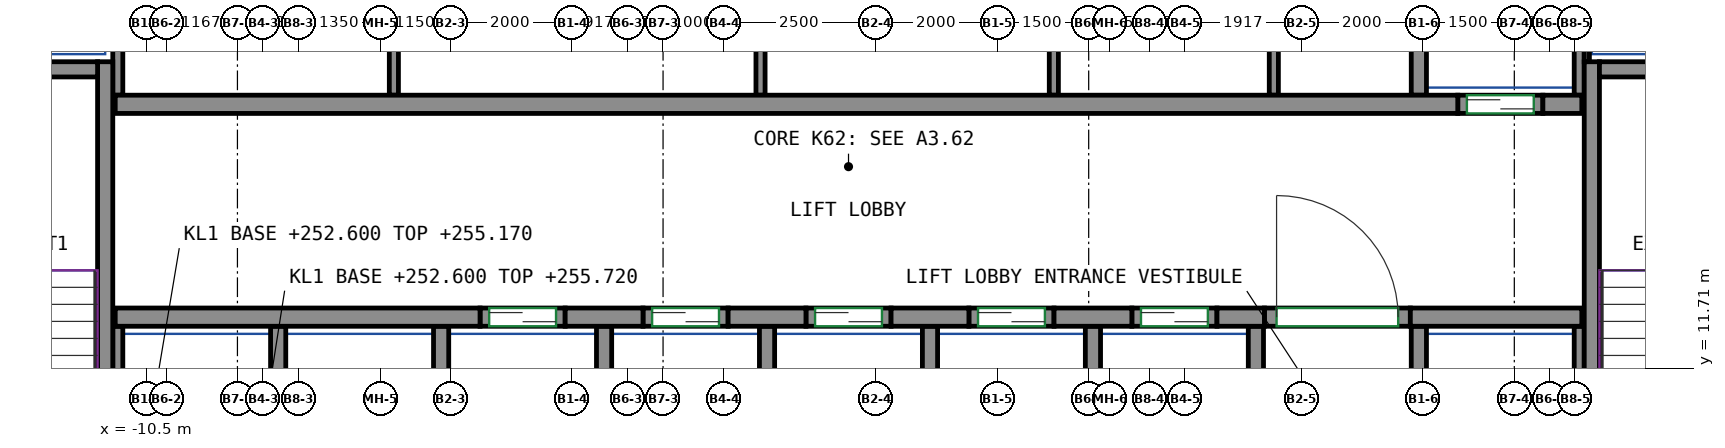
"""IFC4 building model, lengths in metres.
Left out: names, types, materials, properties, quantities, classifications, styles, units other than length and angle.
Written with IfcOpenShell. Run it as: python <this file> out.ifc"""

import sys

from ifc_helpers import new_model, si_unit, direction, frame, frame_2d, origin, place, context, subcontext, project, spatial, rectangle, extrude, source, transform, mapped, element, fill, save


model = new_model("IFC4")
c1 = context("Model", 3, precision=1e-05, world=origin(), true_north=direction((0.0, 1.0)))
c2 = subcontext(c1, "Body", "Model", "MODEL_VIEW")
j1 = project(units=[si_unit("LENGTHUNIT", "METRE"), si_unit("PLANEANGLEUNIT", "RADIAN")], contexts=[c1])
p1 = place(None, origin())
s1 = spatial("IfcSite", under=j1, at=p1, CompositionType="ELEMENT")
p2 = place(p1, origin())
s2 = spatial("IfcBuilding", under=s1, at=p2, CompositionType="ELEMENT")
p3 = place(p2, frame((0.0, 0.0, 252.6)))
s3 = spatial("IfcBuildingStorey", under=s2, at=p3, CompositionType="ELEMENT", Elevation=252.6)
m1 = source(origin(), c2, "Body", "SweptSolid", [
    extrude(rectangle(XDim=7.75, YDim=0.25, at=frame_2d((3.875, 0.0))), origin(), (0.0, 0.0, 1.0), 3.12),
])
p4 = place(p3, frame((-11.175, 9.0, 0.0), z_axis=(0.0, 0.0, 1.0), x_axis=(0.0, 1.0, 0.0)))
e1 = element("IfcWall", 1, at=p4, inside=s3, PredefinedType="SHEAR", context=c2, shape_type="MappedRepresentation", body=[
    mapped(m1, transform((0.0, 0.0, 0.0))),
])
m2 = source(origin(), c2, "Body", "SweptSolid", [
    extrude(rectangle(XDim=3.7, YDim=0.25, at=frame_2d((1.85, 0.0))), origin(), (0.0, 0.0, 1.0), 3.12),
])
p5 = place(p3, frame((-15.0, 16.625, 0.0), z_axis=(0.0, 0.0, 1.0), x_axis=(1.0, 0.0, 0.0)))
e2 = element("IfcWall", 2, at=p5, inside=s3, PredefinedType="SHEAR", context=c2, shape_type="MappedRepresentation", body=[
    mapped(m2, transform((0.0, 0.0, 0.0))),
])
p6 = place(p3, frame((13.275, 9.0, 0.0), z_axis=(0.0, 0.0, 1.0), x_axis=(0.0, 1.0, 0.0)))
e3 = element("IfcWall", 3, at=p6, inside=s3, PredefinedType="SHEAR", context=c2, shape_type="MappedRepresentation", body=[
    mapped(m1, transform((0.0, 0.0, 0.0))),
])
m3 = source(origin(), c2, "Body", "SweptSolid", [
    extrude(rectangle(XDim=3.7, YDim=0.25, at=frame_2d((1.85, 0.0))), origin(), (0.0, 0.0, 1.0), 3.12),
])
p7 = place(p3, frame((13.4, 16.625, 0.0), z_axis=(0.0, 0.0, 1.0), x_axis=(1.0, 0.0, 0.0)))
e4 = element("IfcWall", 4, at=p7, inside=s3, PredefinedType="SHEAR", context=c2, shape_type="MappedRepresentation", body=[
    mapped(m3, transform((0.0, 0.0, 0.0))),
])
m4 = source(origin(), c2, "Body", "SweptSolid", [
    extrude(rectangle(XDim=6.0, YDim=0.3, at=frame_2d((3.0, 0.0))), origin(), (0.0, 0.0, 1.0), 3.12),
])
p8 = place(p3, frame((-11.01, 12.55, 0.0), z_axis=(0.0, 0.0, 1.0), x_axis=(1.0, 0.0, 0.0)))
e5 = element("IfcWall", 5, at=p8, inside=s3, PredefinedType="SHEAR", context=c2, shape_type="MappedRepresentation", body=[
    mapped(m4, transform((0.0, 0.0, 0.0))),
])
m5 = source(origin(), c2, "Body", "SweptSolid", [
    extrude(rectangle(XDim=1.28, YDim=0.3, at=frame_2d((0.64, 0.0))), origin(), (0.0, 0.0, 1.0), 3.12),
])
for number, where, z_axis, x_axis in (
    (6, (-3.61, 12.55, 0.0), (0.0, 0.0, 1.0), (1.0, 0.0, 0.0)),
    (7, (-0.93, 12.55, 0.0), (0.0, 0.0, 1.0), (1.0, 0.0, 0.0)),
    (8, (1.75, 12.55, 0.0), (0.0, 0.0, 1.0), (1.0, 0.0, 0.0)),
    (9, (4.43, 12.55, 0.0), (0.0, 0.0, 1.0), (1.0, 0.0, 0.0)),
):
    element("IfcWall", number, at=place(p3, frame(where, z_axis=z_axis, x_axis=x_axis)), inside=s3, PredefinedType="SHEAR", context=c2, shape_type="MappedRepresentation", body=[
        mapped(m5, transform((0.0, 0.0, 0.0))),
    ])
m6 = source(origin(), c2, "Body", "SweptSolid", [
    extrude(rectangle(XDim=0.78, YDim=0.3, at=frame_2d((0.39, 0.0))), origin(), (0.0, 0.0, 1.0), 3.12),
])
p9 = place(p3, frame((7.11, 12.55, 0.0), z_axis=(0.0, 0.0, 1.0), x_axis=(1.0, 0.0, 0.0)))
e10 = element("IfcWall", 10, at=p9, inside=s3, PredefinedType="SHEAR", context=c2, shape_type="MappedRepresentation", body=[
    mapped(m6, transform((0.0, 0.0, 0.0))),
])
m7 = source(origin(), c2, "Body", "SweptSolid", [
    extrude(rectangle(XDim=2.82, YDim=0.3, at=frame_2d((1.41, 0.0))), origin(), (0.0, 0.0, 1.0), 3.12),
])
p10 = place(p3, frame((10.29, 12.55, 0.0), z_axis=(0.0, 0.0, 1.0), x_axis=(1.0, 0.0, 0.0)))
e11 = element("IfcWall", 11, at=p10, inside=s3, PredefinedType="SHEAR", context=c2, shape_type="MappedRepresentation", body=[
    mapped(m7, transform((0.0, 0.0, 0.0))),
])
m8 = source(origin(), c2, "Body", "SweptSolid", [
    extrude(rectangle(XDim=22.08, YDim=0.3, at=frame_2d((11.04, 0.0))), origin(), (0.0, 0.0, 1.0), 3.12),
])
p11 = place(p3, frame((-11.01, 16.05, 0.0), z_axis=(0.0, 0.0, 1.0), x_axis=(1.0, 0.0, 0.0)))
e12 = element("IfcWall", 12, at=p11, inside=s3, PredefinedType="SHEAR", context=c2, shape_type="MappedRepresentation", body=[
    mapped(m8, transform((0.0, 0.0, 0.0))),
])
m9 = source(origin(), c2, "Body", "SweptSolid", [
    extrude(rectangle(XDim=0.64, YDim=0.3, at=frame_2d((0.32, 0.0))), origin(), (0.0, 0.0, 1.0), 3.12),
])
p12 = place(p3, frame((12.47, 16.05, 0.0), z_axis=(0.0, 0.0, 1.0), x_axis=(1.0, 0.0, 0.0)))
e13 = element("IfcWall", 13, at=p12, inside=s3, PredefinedType="SHEAR", context=c2, shape_type="MappedRepresentation", body=[
    mapped(m9, transform((0.0, 0.0, 0.0))),
])
m10 = source(origin(), c2, "Body", "SweptSolid", [
    extrude(rectangle(XDim=1.4, YDim=0.3, at=frame_2d((0.7, 0.0))), origin(), (0.0, 0.0, 1.0), 3.12),
])
p13 = place(p3, frame((-5.01, 12.55, 0.0), z_axis=(0.0, 0.0, 1.0), x_axis=(1.0, 0.0, 0.0)))
e14 = element("IfcWall", 14, at=p13, inside=s3, PredefinedType="PARTITIONING", context=c2, shape_type="MappedRepresentation", body=[
    mapped(m10, transform((0.0, 0.0, 0.0))),
])
p14 = place(p13, frame((0.15, 0.0, 0.0)))
e15 = element("IfcOpeningElement", 15, at=p14, cuts=e14, PredefinedType="OPENING", context=c2, shape_type="SweptSolid", body=[
    extrude(rectangle(XDim=1.1, YDim=2.1, at=frame_2d((0.55, 1.05))), frame((0.0, 0.16, 0.0), z_axis=(0.0, -1.0, 0.0), x_axis=(1.0, 0.0, 0.0)), (0.0, 0.0, 1.0), 0.32),
])
m11 = source(origin(), c2, "Body", "SweptSolid", [
    extrude(rectangle(XDim=1.4, YDim=0.3, at=frame_2d((0.7, 0.0))), origin(), (0.0, 0.0, 1.0), 3.12),
])
p15 = place(p3, frame((-2.33, 12.55, 0.0), z_axis=(0.0, 0.0, 1.0), x_axis=(1.0, 0.0, 0.0)))
e16 = element("IfcWall", 16, at=p15, inside=s3, PredefinedType="PARTITIONING", context=c2, shape_type="MappedRepresentation", body=[
    mapped(m11, transform((0.0, 0.0, 0.0))),
])
p16 = place(p15, frame((0.15, 0.0, 0.0)))
e17 = element("IfcOpeningElement", 17, at=p16, cuts=e16, PredefinedType="OPENING", context=c2, shape_type="SweptSolid", body=[
    extrude(rectangle(XDim=1.1, YDim=2.1, at=frame_2d((0.55, 1.05))), frame((0.0, 0.16, 0.0), z_axis=(0.0, -1.0, 0.0), x_axis=(1.0, 0.0, 0.0)), (0.0, 0.0, 1.0), 0.32),
])
p17 = place(p3, frame((0.35, 12.55, 0.0), z_axis=(0.0, 0.0, 1.0), x_axis=(1.0, 0.0, 0.0)))
e18 = element("IfcWall", 18, at=p17, inside=s3, PredefinedType="PARTITIONING", context=c2, shape_type="MappedRepresentation", body=[
    mapped(m10, transform((0.0, 0.0, 0.0))),
])
p18 = place(p17, frame((0.15, 0.0, 0.0)))
e19 = element("IfcOpeningElement", 19, at=p18, cuts=e18, PredefinedType="OPENING", context=c2, shape_type="SweptSolid", body=[
    extrude(rectangle(XDim=1.1, YDim=2.1, at=frame_2d((0.55, 1.05))), frame((0.0, 0.16, 0.0), z_axis=(0.0, -1.0, 0.0), x_axis=(1.0, 0.0, 0.0)), (0.0, 0.0, 1.0), 0.32),
])
p19 = place(p3, frame((3.03, 12.55, 0.0), z_axis=(0.0, 0.0, 1.0), x_axis=(1.0, 0.0, 0.0)))
e20 = element("IfcWall", 20, at=p19, inside=s3, PredefinedType="PARTITIONING", context=c2, shape_type="MappedRepresentation", body=[
    mapped(m10, transform((0.0, 0.0, 0.0))),
])
p20 = place(p19, frame((0.15, 0.0, 0.0)))
e21 = element("IfcOpeningElement", 21, at=p20, cuts=e20, PredefinedType="OPENING", context=c2, shape_type="SweptSolid", body=[
    extrude(rectangle(XDim=1.1, YDim=2.1, at=frame_2d((0.55, 1.05))), frame((0.0, 0.16, 0.0), z_axis=(0.0, -1.0, 0.0), x_axis=(1.0, 0.0, 0.0)), (0.0, 0.0, 1.0), 0.32),
])
p21 = place(p3, frame((5.71, 12.55, 0.0), z_axis=(0.0, 0.0, 1.0), x_axis=(1.0, 0.0, 0.0)))
e22 = element("IfcWall", 22, at=p21, inside=s3, PredefinedType="PARTITIONING", context=c2, shape_type="MappedRepresentation", body=[
    mapped(m11, transform((0.0, 0.0, 0.0))),
])
p22 = place(p21, frame((0.15, 0.0, 0.0)))
e23 = element("IfcOpeningElement", 23, at=p22, cuts=e22, PredefinedType="OPENING", context=c2, shape_type="SweptSolid", body=[
    extrude(rectangle(XDim=1.1, YDim=2.1, at=frame_2d((0.55, 1.05))), frame((0.0, 0.16, 0.0), z_axis=(0.0, -1.0, 0.0), x_axis=(1.0, 0.0, 0.0)), (0.0, 0.0, 1.0), 0.32),
])
p23 = place(p3, frame((11.07, 16.05, 0.0), z_axis=(0.0, 0.0, 1.0), x_axis=(1.0, 0.0, 0.0)))
e24 = element("IfcWall", 24, at=p23, inside=s3, PredefinedType="PARTITIONING", context=c2, shape_type="MappedRepresentation", body=[
    mapped(m10, transform((0.0, 0.0, 0.0))),
])
p24 = place(p23, frame((0.15, 0.0, 0.0)))
e25 = element("IfcOpeningElement", 25, at=p24, cuts=e24, PredefinedType="OPENING", context=c2, shape_type="SweptSolid", body=[
    extrude(rectangle(XDim=1.1, YDim=2.1, at=frame_2d((0.55, 1.05))), frame((0.0, 0.16, 0.0), z_axis=(0.0, -1.0, 0.0), x_axis=(1.0, 0.0, 0.0)), (0.0, 0.0, 1.0), 0.32),
])
m12 = source(origin(), c2, "Body", "SweptSolid", [
    extrude(rectangle(XDim=2.4, YDim=0.3, at=frame_2d((1.2, 0.0))), origin(), (0.0, 0.0, 1.0), 3.12),
])
p25 = place(p3, frame((7.89, 12.55, 0.0), z_axis=(0.0, 0.0, 1.0), x_axis=(1.0, 0.0, 0.0)))
e26 = element("IfcWall", 26, at=p25, inside=s3, PredefinedType="PARTITIONING", context=c2, shape_type="MappedRepresentation", body=[
    mapped(m12, transform((0.0, 0.0, 0.0))),
])
p26 = place(p25, frame((0.2, 0.0, 0.0)))
e27 = element("IfcOpeningElement", 27, at=p26, cuts=e26, PredefinedType="OPENING", context=c2, shape_type="SweptSolid", body=[
    extrude(rectangle(XDim=2.0, YDim=2.1, at=frame_2d((1.0, 1.05))), frame((0.0, 0.16, 0.0), z_axis=(0.0, -1.0, 0.0), x_axis=(1.0, 0.0, 0.0)), (0.0, 0.0, 1.0), 0.32),
])
m13 = source(origin(), c2, "Body", "SweptSolid", [
    extrude(rectangle(XDim=3.275, YDim=0.165, at=frame_2d((1.638, 0.0))), origin(), (0.0, 0.0, 1.0), 3.12),
])
p27 = place(p3, frame((13.067, 16.2, 0.0), z_axis=(0.0, 0.0, 1.0), x_axis=(0.0, 1.0, 0.0)))
e28 = element("IfcWall", 28, at=p27, inside=s3, PredefinedType="PARTITIONING", context=c2, shape_type="MappedRepresentation", body=[
    mapped(m13, transform((0.0, 0.0, 0.0))),
])
m14 = source(origin(), c2, "Body", "SweptSolid", [
    extrude(rectangle(XDim=4.8, YDim=0.165, at=frame_2d((2.4, 0.0))), origin(), (0.0, 0.0, 1.0), 3.12),
])
p28 = place(p3, frame((-10.968, 16.2, 0.0), z_axis=(0.0, 0.0, 1.0), x_axis=(0.0, 1.0, 0.0)))
e29 = element("IfcWall", 29, at=p28, inside=s3, PredefinedType="PARTITIONING", context=c2, shape_type="MappedRepresentation", body=[
    mapped(m14, transform((0.0, 0.0, 0.0))),
])
m15 = source(origin(), c2, "Body", "SweptSolid", [
    extrude(rectangle(XDim=3.275, YDim=0.25, at=frame_2d((1.638, 0.0))), origin(), (0.0, 0.0, 1.0), 3.12),
])
p29 = place(p3, frame((10.43, 16.2, 0.0), z_axis=(0.0, 0.0, 1.0), x_axis=(0.0, 1.0, 0.0)))
e30 = element("IfcWall", 30, at=p29, inside=s3, PredefinedType="PARTITIONING", context=c2, shape_type="MappedRepresentation", body=[
    mapped(m15, transform((0.0, 0.0, 0.0))),
])
m16 = source(origin(), c2, "Body", "SweptSolid", [
    extrude(rectangle(XDim=2.725, YDim=0.085, at=frame_2d((1.363, 0.0))), origin(), (0.0, 0.0, 1.0), 3.12),
])
p30 = place(p3, frame((13.192, 16.75, 0.0), z_axis=(0.0, 0.0, 1.0), x_axis=(0.0, 1.0, 0.0)))
e31 = element("IfcWall", 31, at=p30, inside=s3, PredefinedType="PARTITIONING", context=c2, shape_type="MappedRepresentation", body=[
    mapped(m16, transform((0.0, 0.0, 0.0))),
])
m17 = source(origin(), c2, "Body", "SweptSolid", [
    extrude(rectangle(XDim=3.4, YDim=0.25, at=frame_2d((1.7, 0.0))), origin(), (0.0, 0.0, 1.0), 3.12),
])
p31 = place(p3, frame((10.43, 9.0, 0.0), z_axis=(0.0, 0.0, 1.0), x_axis=(0.0, 1.0, 0.0)))
e32 = element("IfcWall", 32, at=p31, inside=s3, PredefinedType="PARTITIONING", context=c2, shape_type="MappedRepresentation", body=[
    mapped(m17, transform((0.0, 0.0, 0.0))),
])
m18 = source(origin(), c2, "Body", "SweptSolid", [
    extrude(rectangle(XDim=3.4, YDim=0.165, at=frame_2d((1.7, 0.0))), origin(), (0.0, 0.0, 1.0), 3.12),
])
p32 = place(p3, frame((13.067, 9.0, 0.0), z_axis=(0.0, 0.0, 1.0), x_axis=(0.0, 1.0, 0.0)))
e33 = element("IfcWall", 33, at=p32, inside=s3, PredefinedType="PARTITIONING", context=c2, shape_type="MappedRepresentation", body=[
    mapped(m18, transform((0.0, 0.0, 0.0))),
])
for number, where, z_axis, x_axis in (
    (34, (2.39, 9.0, 0.0), (0.0, 0.0, 1.0), (0.0, 1.0, 0.0)),
    (35, (5.07, 9.0, 0.0), (0.0, 0.0, 1.0), (0.0, 1.0, 0.0)),
    (36, (7.75, 9.0, 0.0), (0.0, 0.0, 1.0), (0.0, 1.0, 0.0)),
    (37, (-0.29, 9.0, 0.0), (0.0, 0.0, 1.0), (0.0, 1.0, 0.0)),
):
    element("IfcWall", number, at=place(p3, frame(where, z_axis=z_axis, x_axis=x_axis)), inside=s3, PredefinedType="PARTITIONING", context=c2, shape_type="MappedRepresentation", body=[
        mapped(m17, transform((0.0, 0.0, 0.0))),
    ])
p33 = place(p3, frame((-10.968, 9.0, 0.0), z_axis=(0.0, 0.0, 1.0), x_axis=(0.0, 1.0, 0.0)))
e38 = element("IfcWall", 38, at=p33, inside=s3, PredefinedType="PARTITIONING", context=c2, shape_type="MappedRepresentation", body=[
    mapped(m18, transform((0.0, 0.0, 0.0))),
])
for number, where, z_axis, x_axis in (
    (39, (-2.97, 9.0, 0.0), (0.0, 0.0, 1.0), (0.0, 1.0, 0.0)),
    (40, (-5.65, 9.0, 0.0), (0.0, 0.0, 1.0), (0.0, 1.0, 0.0)),
    (41, (-8.33, 9.0, 0.0), (0.0, 0.0, 1.0), (0.0, 1.0, 0.0)),
):
    element("IfcWall", number, at=place(p3, frame(where, z_axis=z_axis, x_axis=x_axis)), inside=s3, PredefinedType="PARTITIONING", context=c2, shape_type="MappedRepresentation", body=[
        mapped(m17, transform((0.0, 0.0, 0.0))),
    ])
m19 = source(origin(), c2, "Body", "SweptSolid", [
    extrude(rectangle(XDim=4.8, YDim=0.15, at=frame_2d((2.4, 0.0))), origin(), (0.0, 0.0, 1.0), 3.12),
])
for number, where, z_axis, x_axis in (
    (42, (-6.427, 16.2, 0.0), (0.0, 0.0, 1.0), (0.0, 1.0, 0.0)),
    (43, (-0.397, 16.2, 0.0), (0.0, 0.0, 1.0), (0.0, 1.0, 0.0)),
    (44, (4.427, 16.2, 0.0), (0.0, 0.0, 1.0), (0.0, 1.0, 0.0)),
    (45, (8.045, 16.2, 0.0), (0.0, 0.0, 1.0), (0.0, 1.0, 0.0)),
):
    element("IfcWall", number, at=place(p3, frame(where, z_axis=z_axis, x_axis=x_axis)), inside=s3, PredefinedType="PARTITIONING", context=c2, shape_type="MappedRepresentation", body=[
        mapped(m19, transform((0.0, 0.0, 0.0))),
    ])
p34 = place(p26, origin())
e46 = element("IfcDoor", 46, at=p34, inside=s3, OperationType="DOUBLE_DOOR_SINGLE_SWING", PredefinedType="DOOR", context=c2, shape_type="SweptSolid", body=[
    extrude(rectangle(XDim=2.0, YDim=2.1, at=frame_2d((1.0, 1.05))), frame((0.0, 0.025, 0.0), z_axis=(0.0, -1.0, 0.0), x_axis=(1.0, 0.0, 0.0)), (0.0, 0.0, 1.0), 0.05),
])
fill(e27, e46)
p35 = place(p14, origin())
e47 = element("IfcDoor", 47, at=p35, inside=s3, OperationType="DOUBLE_DOOR_SLIDING", PredefinedType="DOOR", context=c2, shape_type="SweptSolid", body=[
    extrude(rectangle(XDim=1.1, YDim=2.1, at=frame_2d((0.55, 1.05))), frame((0.0, 0.025, 0.0), z_axis=(0.0, -1.0, 0.0), x_axis=(1.0, 0.0, 0.0)), (0.0, 0.0, 1.0), 0.05),
])
fill(e15, e47)
p36 = place(p16, origin())
e48 = element("IfcDoor", 48, at=p36, inside=s3, OperationType="DOUBLE_DOOR_SLIDING", PredefinedType="DOOR", context=c2, shape_type="SweptSolid", body=[
    extrude(rectangle(XDim=1.1, YDim=2.1, at=frame_2d((0.55, 1.05))), frame((0.0, 0.025, 0.0), z_axis=(0.0, -1.0, 0.0), x_axis=(1.0, 0.0, 0.0)), (0.0, 0.0, 1.0), 0.05),
])
fill(e17, e48)
p37 = place(p18, origin())
e49 = element("IfcDoor", 49, at=p37, inside=s3, OperationType="DOUBLE_DOOR_SLIDING", PredefinedType="DOOR", context=c2, shape_type="SweptSolid", body=[
    extrude(rectangle(XDim=1.1, YDim=2.1, at=frame_2d((0.55, 1.05))), frame((0.0, 0.025, 0.0), z_axis=(0.0, -1.0, 0.0), x_axis=(1.0, 0.0, 0.0)), (0.0, 0.0, 1.0), 0.05),
])
fill(e19, e49)
p38 = place(p20, origin())
e50 = element("IfcDoor", 50, at=p38, inside=s3, OperationType="DOUBLE_DOOR_SLIDING", PredefinedType="DOOR", context=c2, shape_type="SweptSolid", body=[
    extrude(rectangle(XDim=1.1, YDim=2.1, at=frame_2d((0.55, 1.05))), frame((0.0, 0.025, 0.0), z_axis=(0.0, -1.0, 0.0), x_axis=(1.0, 0.0, 0.0)), (0.0, 0.0, 1.0), 0.05),
])
fill(e21, e50)
p39 = place(p22, origin())
e51 = element("IfcDoor", 51, at=p39, inside=s3, OperationType="DOUBLE_DOOR_SLIDING", PredefinedType="DOOR", context=c2, shape_type="SweptSolid", body=[
    extrude(rectangle(XDim=1.1, YDim=2.1, at=frame_2d((0.55, 1.05))), frame((0.0, 0.025, 0.0), z_axis=(0.0, -1.0, 0.0), x_axis=(1.0, 0.0, 0.0)), (0.0, 0.0, 1.0), 0.05),
])
fill(e23, e51)
p40 = place(p24, origin())
e52 = element("IfcDoor", 52, at=p40, inside=s3, OperationType="DOUBLE_DOOR_SLIDING", PredefinedType="DOOR", context=c2, shape_type="SweptSolid", body=[
    extrude(rectangle(XDim=1.1, YDim=2.1, at=frame_2d((0.55, 1.05))), frame((0.0, 0.025, 0.0), z_axis=(0.0, -1.0, 0.0), x_axis=(1.0, 0.0, 0.0)), (0.0, 0.0, 1.0), 0.05),
])
fill(e25, e52)
save(model, sys.argv[1])
